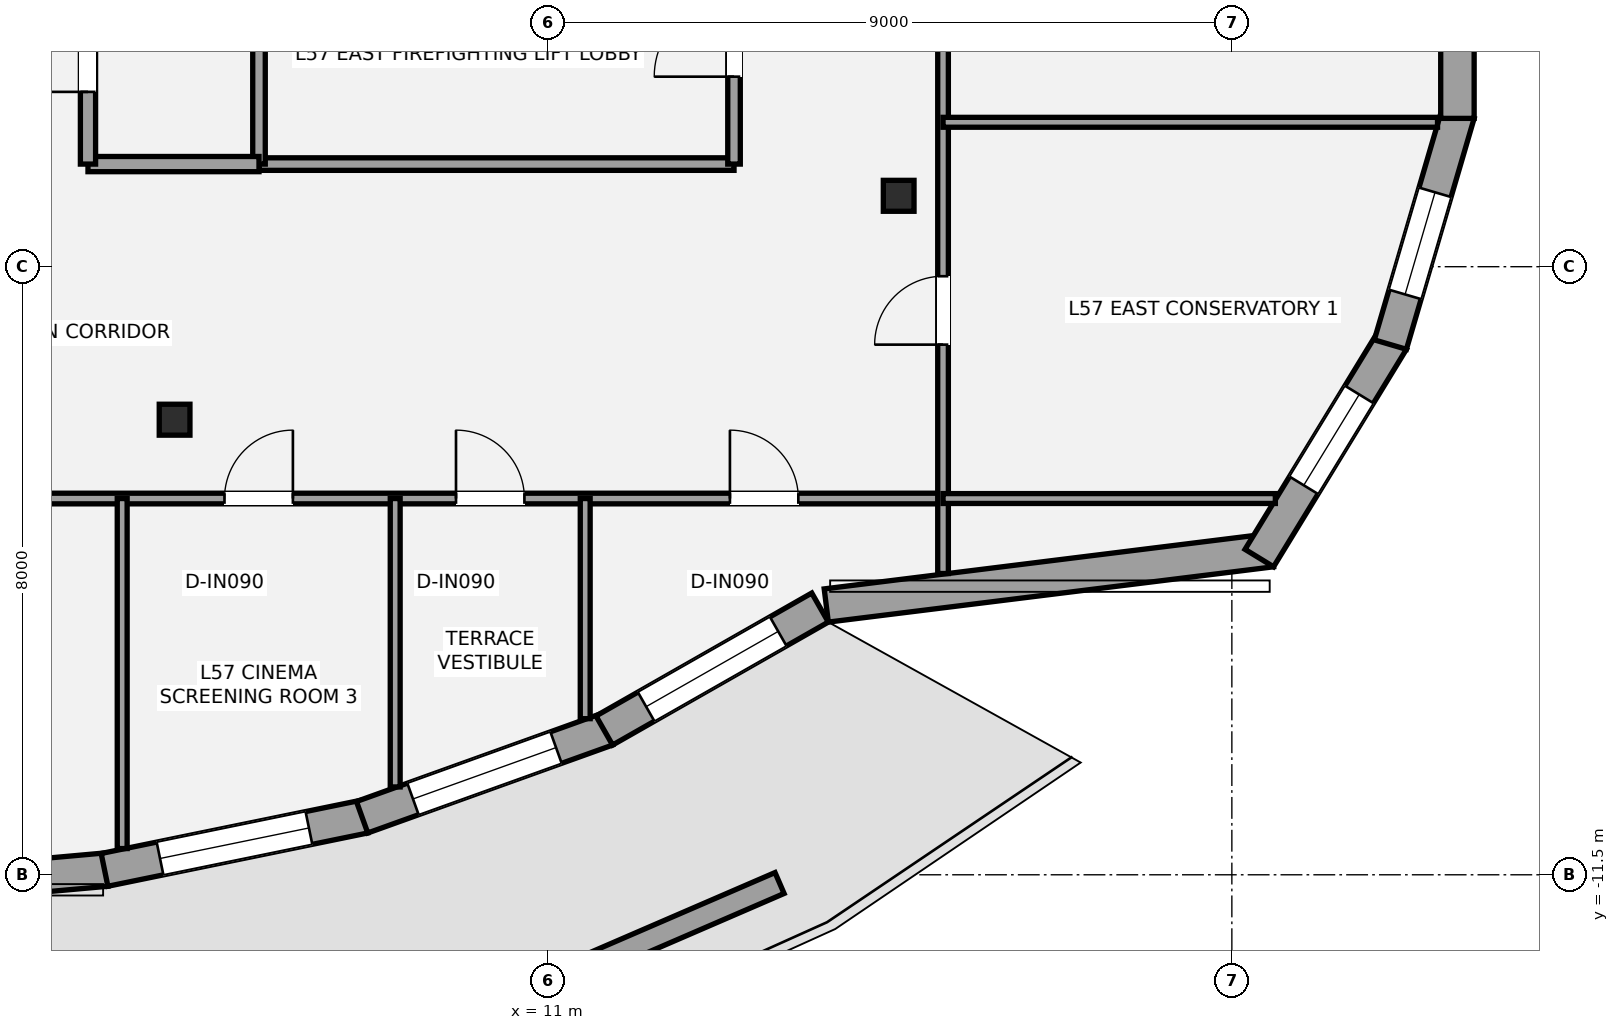
"""IFC4 building model, lengths in metres.
Left out: names, types, materials, properties, quantities, classifications, styles, units other than length and angle.
Written with IfcOpenShell. Run it as: python <this file> out.ifc"""

import sys

from ifc_helpers import new_model, si_unit, direction, frame, frame_2d, origin, origin_2d, place, context, subcontext, project, spatial, rectangle, i_section, extrude, element, fill, save


model = new_model("IFC4")
c1 = context("Model", 3, precision=1e-05, world=origin(), true_north=direction((0.0, 1.0)))
c2 = subcontext(c1, "Body", "Model", "MODEL_VIEW")
j1 = project(units=[si_unit("LENGTHUNIT", "METRE"), si_unit("PLANEANGLEUNIT", "RADIAN")], contexts=[c1])
p1 = place(None, origin())
s1 = spatial("IfcSite", under=j1, at=p1, CompositionType="ELEMENT")
p2 = place(p1, origin())
s2 = spatial("IfcBuilding", under=s1, at=p2, CompositionType="ELEMENT")
p3 = place(p2, frame((0.0, 0.0, 205.9)))
s3 = spatial("IfcBuildingStorey", under=s2, at=p3, CompositionType="ELEMENT", Elevation=205.9)
for number, where, z_axis, x_axis in (
    (1, (6.09, -5.513, 0.0), (0.0, 0.0, 1.0), (1.0, 0.0, 0.0)),
    (2, (15.616, -2.567, 0.0), (0.0, 0.0, 1.0), (1.0, 0.0, 0.0)),
):
    element("IfcColumn", number, at=place(p3, frame(where, z_axis=z_axis, x_axis=x_axis)), inside=s3, PredefinedType="COLUMN", context=c2, shape_type="SweptSolid", body=[
        extrude(i_section(OverallWidth=0.404, OverallDepth=0.407, WebThickness=0.027, FlangeThickness=0.044, at=origin_2d()), origin(), (0.0, 0.0, 1.0), 4.1),
    ])
p4 = place(p3, frame((5.192, -11.432, 0.0), z_axis=(0.0, 0.0, 1.0), x_axis=(-0.995978811691, -0.089589099014, 0.0)))
e3 = element("IfcWall", 3, at=p4, inside=s3, PredefinedType="STANDARD", context=c2, shape_type="SweptSolid", body=[
    extrude(rectangle(XDim=3.488, YDim=0.44, at=frame_2d((1.744, 0.0))), origin(), (0.0, 0.0, 1.0), 3.219),
])
p5 = place(p4, frame((1.396, 0.0, 0.0)))
e4 = element("IfcOpeningElement", 4, at=p5, cuts=e3, PredefinedType="OPENING", context=c2, shape_type="SweptSolid", body=[
    extrude(rectangle(XDim=1.1, YDim=2.15, at=frame_2d((0.55, 1.075))), frame((0.0, 0.23, 0.0), z_axis=(0.0, -1.0, 0.0), x_axis=(1.0, 0.0, 0.0)), (0.0, 0.0, 1.0), 0.46),
])
p6 = place(p3, frame((8.587, -10.735, 0.0), z_axis=(0.0, 0.0, 1.0), x_axis=(-0.979641518613, -0.200754813168, 0.0)))
e5 = element("IfcWall", 5, at=p6, inside=s3, PredefinedType="STANDARD", context=c2, shape_type="SweptSolid", body=[
    extrude(rectangle(XDim=3.49, YDim=0.44, at=frame_2d((1.745, 0.0))), origin(), (0.0, 0.0, 1.0), 3.219),
])
p7 = place(p6, frame((0.745, 0.0, 0.6)))
e6 = element("IfcOpeningElement", 6, at=p7, cuts=e5, PredefinedType="OPENING", context=c2, shape_type="SweptSolid", body=[
    extrude(rectangle(XDim=2.0, YDim=2.1, at=frame_2d((1.0, 1.05))), frame((0.0, 0.23, 0.0), z_axis=(0.0, -1.0, 0.0), x_axis=(1.0, 0.0, 0.0)), (0.0, 0.0, 1.0), 0.46),
])
p8 = place(p3, frame((11.778, -9.586, 0.0), z_axis=(0.0, 0.0, 1.0), x_axis=(-0.941148128718, -0.337994378372, 0.0)))
e7 = element("IfcWall", 7, at=p8, inside=s3, PredefinedType="STANDARD", context=c2, shape_type="SweptSolid", body=[
    extrude(rectangle(XDim=3.422, YDim=0.44, at=frame_2d((1.711, 0.0))), origin(), (0.0, 0.0, 1.0), 3.219),
])
p9 = place(p8, frame((0.711, 0.0, 0.6)))
e8 = element("IfcOpeningElement", 8, at=p9, cuts=e7, PredefinedType="OPENING", context=c2, shape_type="SweptSolid", body=[
    extrude(rectangle(XDim=2.0, YDim=2.1, at=frame_2d((1.0, 1.05))), frame((0.0, 0.23, 0.0), z_axis=(0.0, -1.0, 0.0), x_axis=(1.0, 0.0, 0.0)), (0.0, 0.0, 1.0), 0.46),
])
p10 = place(p3, frame((14.582, -7.984, 0.0), z_axis=(0.0, 0.0, 1.0), x_axis=(-0.868821952469, -0.49512464583, 0.0)))
e9 = element("IfcWall", 9, at=p10, inside=s3, PredefinedType="STANDARD", context=c2, shape_type="SweptSolid", body=[
    extrude(rectangle(XDim=3.267, YDim=0.44, at=frame_2d((1.634, 0.0))), origin(), (0.0, 0.0, 1.0), 3.219),
])
p11 = place(p10, frame((0.634, 0.0, 0.6)))
e10 = element("IfcOpeningElement", 10, at=p11, cuts=e9, PredefinedType="OPENING", context=c2, shape_type="SweptSolid", body=[
    extrude(rectangle(XDim=2.0, YDim=2.1, at=frame_2d((1.0, 1.05))), frame((0.0, 0.23, 0.0), z_axis=(0.0, -1.0, 0.0), x_axis=(1.0, 0.0, 0.0)), (0.0, 0.0, 1.0), 0.46),
])
p12 = place(p3, frame((20.522, -7.23, 0.0), z_axis=(0.0, 0.0, 1.0), x_axis=(-0.992376185076, -0.123245719172, 0.0)))
e11 = element("IfcWall", 11, at=p12, inside=s3, PredefinedType="STANDARD", context=c2, shape_type="SweptSolid", body=[
    extrude(rectangle(XDim=5.903, YDim=0.44, at=frame_2d((2.952, 0.0))), origin(), (0.0, 0.0, 1.0), 3.215),
])
p13 = place(p3, frame((22.109, -4.472, 0.0), z_axis=(0.0, 0.0, 1.0), x_axis=(-0.521214394333, -0.853425775999, 0.0)))
e12 = element("IfcWall", 12, at=p13, inside=s3, PredefinedType="STANDARD", context=c2, shape_type="SweptSolid", body=[
    extrude(rectangle(XDim=3.353, YDim=0.44, at=frame_2d((1.677, 0.0))), origin(), (0.0, 0.0, 1.0), 3.215),
])
p14 = place(p13, frame((0.831, 0.0, 0.58)))
e13 = element("IfcOpeningElement", 13, at=p14, cuts=e12, PredefinedType="OPENING", context=c2, shape_type="SweptSolid", body=[
    extrude(rectangle(XDim=1.4, YDim=1.55, at=frame_2d((0.7, 0.775))), frame((0.0, 0.23, 0.0), z_axis=(0.0, -1.0, 0.0), x_axis=(1.0, 0.0, 0.0)), (0.0, 0.0, 1.0), 0.46),
])
p15 = place(p3, frame((22.977, -1.487, 0.0), z_axis=(0.0, 0.0, 1.0), x_axis=(-0.281477355005, -0.959567870773, 0.0)))
e14 = element("IfcWall", 14, at=p15, inside=s3, PredefinedType="STANDARD", context=c2, shape_type="SweptSolid", body=[
    extrude(rectangle(XDim=3.166, YDim=0.44, at=frame_2d((1.583, 0.0))), origin(), (0.0, 0.0, 1.0), 3.215),
])
p16 = place(p15, frame((1.078, 0.0, 0.58)))
e15 = element("IfcOpeningElement", 15, at=p16, cuts=e14, PredefinedType="OPENING", context=c2, shape_type="SweptSolid", body=[
    extrude(rectangle(XDim=1.4, YDim=1.55, at=frame_2d((0.7, 0.775))), frame((0.0, 0.23, 0.0), z_axis=(0.0, -1.0, 0.0), x_axis=(1.0, 0.0, 0.0)), (0.0, 0.0, 1.0), 0.46),
])
p17 = place(p3, frame((22.968, 1.549, 0.0), z_axis=(0.0, 0.0, 1.0), x_axis=(0.0, -1.0, 0.0)))
e16 = element("IfcWall", 16, at=p17, inside=s3, PredefinedType="STANDARD", context=c2, shape_type="SweptSolid", body=[
    extrude(rectangle(XDim=3.097, YDim=0.44, at=frame_2d((1.549, 0.0))), origin(), (0.0, 0.0, 1.0), 3.219),
])
p18 = place(p17, frame((0.549, 0.0, 0.58)))
e17 = element("IfcOpeningElement", 17, at=p18, cuts=e16, PredefinedType="OPENING", context=c2, shape_type="SweptSolid", body=[
    extrude(rectangle(XDim=1.4, YDim=1.55, at=frame_2d((0.7, 0.775))), frame((0.0, 0.23, 0.0), z_axis=(0.0, -1.0, 0.0), x_axis=(1.0, 0.0, 0.0)), (0.0, 0.0, 1.0), 0.46),
])
p19 = place(p3, frame((10.396, -13.188, 0.0), z_axis=(0.0, 0.0, 1.0), x_axis=(0.917864886546, 0.396892995713, 0.0)))
e18 = element("IfcWall", 18, at=p19, inside=s3, PredefinedType="PARAPET", context=c2, shape_type="SweptSolid", body=[
    extrude(rectangle(XDim=3.98, YDim=0.3, at=frame_2d((1.99, 0.0))), origin(), (0.0, 0.0, 1.0), 0.45),
])
p20 = place(p3, frame((7.2, -2.15, 0.0), z_axis=(0.0, 0.0, 1.0), x_axis=(1.0, 0.0, 0.0)))
e19 = element("IfcWall", 19, at=p20, inside=s3, PredefinedType="PARTITIONING", context=c2, shape_type="SweptSolid", body=[
    extrude(rectangle(XDim=6.25, YDim=0.165, at=frame_2d((3.125, 0.0))), origin(), (0.0, 0.0, 1.0), 3.92),
])
p21 = place(p3, frame((7.2, -2.15, 0.0), z_axis=(0.0, 0.0, 1.0), x_axis=(0.0, 1.0, 0.0)))
e20 = element("IfcWall", 20, at=p21, inside=s3, PredefinedType="PARTITIONING", context=c2, shape_type="SweptSolid", body=[
    extrude(rectangle(XDim=3.4, YDim=0.165, at=frame_2d((1.7, 0.0))), origin(), (0.0, 0.0, 1.0), 3.373),
])
p22 = place(p3, frame((13.45, -2.15, 0.0), z_axis=(0.0, 0.0, 1.0), x_axis=(0.0, 1.0, 0.0)))
e21 = element("IfcWall", 21, at=p22, inside=s3, PredefinedType="PARTITIONING", context=c2, shape_type="SweptSolid", body=[
    extrude(rectangle(XDim=3.4, YDim=0.165, at=frame_2d((1.7, 0.0))), origin(), (0.0, 0.0, 1.0), 3.92),
])
p23 = place(p22, frame((1.15, 0.0, 0.0)))
e22 = element("IfcOpeningElement", 22, at=p23, cuts=e21, PredefinedType="OPENING", context=c2, shape_type="SweptSolid", body=[
    extrude(rectangle(XDim=1.05, YDim=2.15, at=frame_2d((0.525, 1.075))), frame((0.0, 0.093, 0.0), z_axis=(0.0, -1.0, 0.0), x_axis=(1.0, 0.0, 0.0)), (0.0, 0.0, 1.0), 0.185),
])
p24 = place(p3, frame((4.95, -2.15, 0.0), z_axis=(0.0, 0.0, 1.0), x_axis=(1.0, 0.0, 0.0)))
e23 = element("IfcWall", 23, at=p24, inside=s3, PredefinedType="SOLIDWALL", context=c2, shape_type="SweptSolid", body=[
    extrude(rectangle(XDim=2.25, YDim=0.2, at=frame_2d((1.125, 0.0))), origin(), (0.0, 0.0, 1.0), 3.92),
])
p25 = place(p3, frame((4.95, -2.15, 0.0), z_axis=(0.0, 0.0, 1.0), x_axis=(0.0, 1.0, 0.0)))
e24 = element("IfcWall", 24, at=p25, inside=s3, PredefinedType="SOLIDWALL", context=c2, shape_type="SweptSolid", body=[
    extrude(rectangle(XDim=3.4, YDim=0.2, at=frame_2d((1.7, 0.0))), origin(), (0.0, 0.0, 1.0), 3.373),
])
p26 = place(p25, frame((0.95, 0.0, 0.0)))
e25 = element("IfcOpeningElement", 25, at=p26, cuts=e24, PredefinedType="OPENING", context=c2, shape_type="SweptSolid", body=[
    extrude(rectangle(XDim=0.75, YDim=2.1, at=frame_2d((0.375, 1.05))), frame((0.0, 0.11, 0.0), z_axis=(0.0, -1.0, 0.0), x_axis=(1.0, 0.0, 0.0)), (0.0, 0.0, 1.0), 0.22),
])
p27 = place(p3, frame((-15.7, -6.55, 0.0), z_axis=(0.0, 0.0, 1.0), x_axis=(1.0, 0.0, 0.0)))
e26 = element("IfcWall", 26, at=p27, inside=s3, PredefinedType="PARTITIONING", context=c2, shape_type="SweptSolid", body=[
    extrude(rectangle(XDim=31.9, YDim=0.14, at=frame_2d((15.95, 0.0))), origin(), (0.0, 0.0, 1.0), 3.373),
])
p28 = place(p27, frame((5.5, 0.0, 0.0)))
e27 = element("IfcOpeningElement", 27, at=p28, cuts=e26, PredefinedType="OPENING", context=c2, shape_type="SweptSolid", body=[
    extrude(rectangle(XDim=0.9, YDim=2.1, at=frame_2d((0.45, 1.05))), frame((0.0, 0.08, 0.0), z_axis=(0.0, -1.0, 0.0), x_axis=(1.0, 0.0, 0.0)), (0.0, 0.0, 1.0), 0.16),
])
p29 = place(p27, frame((16.05, 0.0, 0.0)))
e28 = element("IfcOpeningElement", 28, at=p29, cuts=e26, PredefinedType="OPENING", context=c2, shape_type="SweptSolid", body=[
    extrude(rectangle(XDim=0.9, YDim=2.1, at=frame_2d((0.45, 1.05))), frame((0.0, 0.08, 0.0), z_axis=(0.0, -1.0, 0.0), x_axis=(1.0, 0.0, 0.0)), (0.0, 0.0, 1.0), 0.16),
])
p30 = place(p27, frame((22.446, 0.0, 0.0)))
e29 = element("IfcOpeningElement", 29, at=p30, cuts=e26, PredefinedType="OPENING", context=c2, shape_type="SweptSolid", body=[
    extrude(rectangle(XDim=0.9, YDim=2.1, at=frame_2d((0.45, 1.05))), frame((0.0, 0.08, 0.0), z_axis=(0.0, -1.0, 0.0), x_axis=(1.0, 0.0, 0.0)), (0.0, 0.0, 1.0), 0.16),
])
p31 = place(p27, frame((25.492, 0.0, 0.0)))
e30 = element("IfcOpeningElement", 30, at=p31, cuts=e26, PredefinedType="OPENING", context=c2, shape_type="SweptSolid", body=[
    extrude(rectangle(XDim=0.9, YDim=2.1, at=frame_2d((0.45, 1.05))), frame((0.0, 0.08, 0.0), z_axis=(0.0, -1.0, 0.0), x_axis=(1.0, 0.0, 0.0)), (0.0, 0.0, 1.0), 0.16),
])
p32 = place(p27, frame((29.096, 0.0, 0.0)))
e31 = element("IfcOpeningElement", 31, at=p32, cuts=e26, PredefinedType="OPENING", context=c2, shape_type="SweptSolid", body=[
    extrude(rectangle(XDim=0.9, YDim=2.1, at=frame_2d((0.45, 1.05))), frame((0.0, 0.08, 0.0), z_axis=(0.0, -1.0, 0.0), x_axis=(1.0, 0.0, 0.0)), (0.0, 0.0, 1.0), 0.16),
])
p33 = place(p3, frame((16.2, -7.537, 0.0), z_axis=(0.0, 0.0, 1.0), x_axis=(0.0, 1.0, 0.0)))
e32 = element("IfcWall", 32, at=p33, inside=s3, PredefinedType="PARTITIONING", context=c2, shape_type="SweptSolid", body=[
    extrude(rectangle(XDim=9.937, YDim=0.14, at=frame_2d((4.968, 0.0))), origin(), (0.0, 0.0, 1.0), 3.307),
])
p34 = place(p33, frame((3.011, 0.0, 0.0)))
e33 = element("IfcOpeningElement", 33, at=p34, cuts=e32, PredefinedType="OPENING", context=c2, shape_type="SweptSolid", body=[
    extrude(rectangle(XDim=0.9, YDim=2.1, at=frame_2d((0.45, 1.05))), frame((0.0, 0.08, 0.0), z_axis=(0.0, -1.0, 0.0), x_axis=(1.0, 0.0, 0.0)), (0.0, 0.0, 1.0), 0.16),
])
p35 = place(p33, frame((7.846, 0.0, 0.0)))
e34 = element("IfcOpeningElement", 34, at=p35, cuts=e32, PredefinedType="OPENING", context=c2, shape_type="SweptSolid", body=[
    extrude(rectangle(XDim=0.9, YDim=2.1, at=frame_2d((0.45, 1.05))), frame((0.0, 0.08, 0.0), z_axis=(0.0, -1.0, 0.0), x_axis=(1.0, 0.0, 0.0)), (0.0, 0.0, 1.0), 0.16),
])
p36 = place(p3, frame((5.4, -11.155, 0.0), z_axis=(0.0, 0.0, 1.0), x_axis=(0.0, 1.0, 0.0)))
e35 = element("IfcWall", 35, at=p36, inside=s3, PredefinedType="PARTITIONING", context=c2, shape_type="SweptSolid", body=[
    extrude(rectangle(XDim=4.605, YDim=0.13, at=frame_2d((2.302, 0.0))), origin(), (0.0, 0.0, 1.0), 3.92),
])
p37 = place(p3, frame((8.992, -10.344, 0.0), z_axis=(0.0, 0.0, 1.0), x_axis=(0.0, 1.0, 0.0)))
e36 = element("IfcWall", 36, at=p37, inside=s3, PredefinedType="PARTITIONING", context=c2, shape_type="SweptSolid", body=[
    extrude(rectangle(XDim=3.794, YDim=0.13, at=frame_2d((1.897, 0.0))), origin(), (0.0, 0.0, 1.0), 3.92),
])
p38 = place(p3, frame((11.492, -9.446, 0.0), z_axis=(0.0, 0.0, 1.0), x_axis=(0.0, 1.0, 0.0)))
e37 = element("IfcWall", 37, at=p38, inside=s3, PredefinedType="PARTITIONING", context=c2, shape_type="SweptSolid", body=[
    extrude(rectangle(XDim=2.896, YDim=0.13, at=frame_2d((1.448, 0.0))), origin(), (0.0, 0.0, 1.0), 3.373),
])
p39 = place(p3, frame((16.2, -6.55, 0.0), z_axis=(0.0, 0.0, 1.0), x_axis=(1.0, 0.0, 0.0)))
e38 = element("IfcWall", 38, at=p39, inside=s3, PredefinedType="PARTITIONING", context=c2, shape_type="SweptSolid", body=[
    extrude(rectangle(XDim=4.373, YDim=0.13, at=frame_2d((2.186, 0.0))), origin(), (0.0, 0.0, 1.0), 3.217),
])
p40 = place(p3, frame((16.2, -1.6, 0.0), z_axis=(0.0, 0.0, 1.0), x_axis=(1.0, 0.0, 0.0)))
e39 = element("IfcWall", 39, at=p40, inside=s3, PredefinedType="PARTITIONING", context=c2, shape_type="SweptSolid", body=[
    extrude(rectangle(XDim=6.506, YDim=0.13, at=frame_2d((3.253, 0.0))), origin(), (0.0, 0.0, 1.0), 3.373),
])
p41 = place(p7, origin())
e40 = element("IfcWindow", 40, at=p41, inside=s3, PartitioningType="SINGLE_PANEL", PredefinedType="WINDOW", context=c2, shape_type="SweptSolid", body=[
    extrude(rectangle(XDim=2.0, YDim=2.1, at=frame_2d((1.0, 1.05))), frame((0.0, -0.01, 0.0), z_axis=(0.0, -1.0, 0.0), x_axis=(1.0, 0.0, 0.0)), (0.0, 0.0, 1.0), 0.06),
])
fill(e6, e40)
p42 = place(p9, origin())
e41 = element("IfcWindow", 41, at=p42, inside=s3, PartitioningType="SINGLE_PANEL", PredefinedType="WINDOW", context=c2, shape_type="SweptSolid", body=[
    extrude(rectangle(XDim=2.0, YDim=2.1, at=frame_2d((1.0, 1.05))), frame((0.0, -0.01, 0.0), z_axis=(0.0, -1.0, 0.0), x_axis=(1.0, 0.0, 0.0)), (0.0, 0.0, 1.0), 0.06),
])
fill(e8, e41)
p43 = place(p11, origin())
e42 = element("IfcWindow", 42, at=p43, inside=s3, PartitioningType="SINGLE_PANEL", PredefinedType="WINDOW", context=c2, shape_type="SweptSolid", body=[
    extrude(rectangle(XDim=2.0, YDim=2.1, at=frame_2d((1.0, 1.05))), frame((0.0, -0.01, 0.0), z_axis=(0.0, -1.0, 0.0), x_axis=(1.0, 0.0, 0.0)), (0.0, 0.0, 1.0), 0.06),
])
fill(e10, e42)
p44 = place(p14, origin())
e43 = element("IfcWindow", 43, at=p44, inside=s3, PartitioningType="SINGLE_PANEL", PredefinedType="WINDOW", context=c2, shape_type="SweptSolid", body=[
    extrude(rectangle(XDim=1.4, YDim=1.55, at=frame_2d((0.7, 0.775))), frame((0.0, -0.01, 0.0), z_axis=(0.0, -1.0, 0.0), x_axis=(1.0, 0.0, 0.0)), (0.0, 0.0, 1.0), 0.06),
])
fill(e13, e43)
p45 = place(p16, origin())
e44 = element("IfcWindow", 44, at=p45, inside=s3, PartitioningType="SINGLE_PANEL", PredefinedType="WINDOW", context=c2, shape_type="SweptSolid", body=[
    extrude(rectangle(XDim=1.4, YDim=1.55, at=frame_2d((0.7, 0.775))), frame((0.0, -0.01, 0.0), z_axis=(0.0, -1.0, 0.0), x_axis=(1.0, 0.0, 0.0)), (0.0, 0.0, 1.0), 0.06),
])
fill(e15, e44)
p46 = place(p23, origin())
e45 = element("IfcDoor", 45, at=p46, inside=s3, OperationType="SINGLE_SWING_LEFT", PredefinedType="DOOR", context=c2, shape_type="SweptSolid", body=[
    extrude(rectangle(XDim=1.05, YDim=2.15, at=frame_2d((0.525, 1.075))), frame((0.0, 0.025, 0.0), z_axis=(0.0, -1.0, 0.0), x_axis=(1.0, 0.0, 0.0)), (0.0, 0.0, 1.0), 0.05),
])
fill(e22, e45)
p47 = place(p26, origin())
e46 = element("IfcDoor", 46, at=p47, inside=s3, OperationType="SINGLE_SWING_LEFT", PredefinedType="DOOR", context=c2, shape_type="SweptSolid", body=[
    extrude(rectangle(XDim=0.75, YDim=2.1, at=frame_2d((0.375, 1.05))), frame((0.0, 0.025, 0.0), z_axis=(0.0, -1.0, 0.0), x_axis=(1.0, 0.0, 0.0)), (0.0, 0.0, 1.0), 0.05),
])
fill(e25, e46)
p48 = place(p30, origin())
e47 = element("IfcDoor", 47, at=p48, inside=s3, OperationType="SINGLE_SWING_RIGHT", PredefinedType="DOOR", context=c2, shape_type="SweptSolid", body=[
    extrude(rectangle(XDim=0.9, YDim=2.1, at=frame_2d((0.45, 1.05))), frame((0.0, 0.025, 0.0), z_axis=(0.0, -1.0, 0.0), x_axis=(1.0, 0.0, 0.0)), (0.0, 0.0, 1.0), 0.05),
])
fill(e29, e47)
p49 = place(p31, origin())
e48 = element("IfcDoor", 48, at=p49, inside=s3, OperationType="SINGLE_SWING_LEFT", PredefinedType="DOOR", context=c2, shape_type="SweptSolid", body=[
    extrude(rectangle(XDim=0.9, YDim=2.1, at=frame_2d((0.45, 1.05))), frame((0.0, 0.025, 0.0), z_axis=(0.0, -1.0, 0.0), x_axis=(1.0, 0.0, 0.0)), (0.0, 0.0, 1.0), 0.05),
])
fill(e30, e48)
p50 = place(p32, origin())
e49 = element("IfcDoor", 49, at=p50, inside=s3, OperationType="SINGLE_SWING_LEFT", PredefinedType="DOOR", context=c2, shape_type="SweptSolid", body=[
    extrude(rectangle(XDim=0.9, YDim=2.1, at=frame_2d((0.45, 1.05))), frame((0.0, 0.025, 0.0), z_axis=(0.0, -1.0, 0.0), x_axis=(1.0, 0.0, 0.0)), (0.0, 0.0, 1.0), 0.05),
])
fill(e31, e49)
p51 = place(p34, origin())
e50 = element("IfcDoor", 50, at=p51, inside=s3, OperationType="SINGLE_SWING_LEFT", PredefinedType="DOOR", context=c2, shape_type="SweptSolid", body=[
    extrude(rectangle(XDim=0.9, YDim=2.1, at=frame_2d((0.45, 1.05))), frame((0.0, 0.025, 0.0), z_axis=(0.0, -1.0, 0.0), x_axis=(1.0, 0.0, 0.0)), (0.0, 0.0, 1.0), 0.05),
])
fill(e33, e50)
save(model, sys.argv[1])
